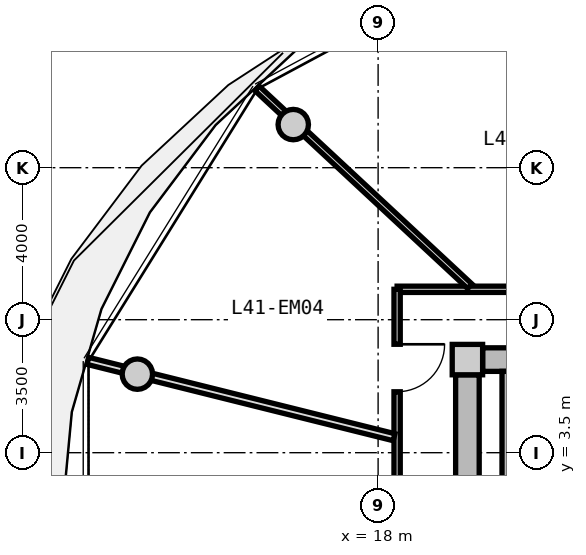
"""IFC4 building model, lengths in metres.
Left out: names, types, materials, properties, quantities, classifications, styles, units other than length and angle.
Written with IfcOpenShell. Run it as: python <this file> out.ifc"""

import sys

from ifc_helpers import new_model, si_unit, direction, frame, frame_2d, origin, origin_2d, place, context, subcontext, project, spatial, rectangle, circle, extrude, source, transform, mapped, element, fill, save


model = new_model("IFC4")
c1 = context("Model", 3, precision=1e-05, world=origin(), true_north=direction((0.0, 1.0)))
c2 = subcontext(c1, "Body", "Model", "MODEL_VIEW")
j1 = project(units=[si_unit("LENGTHUNIT", "METRE"), si_unit("PLANEANGLEUNIT", "RADIAN")], contexts=[c1])
p1 = place(None, origin())
s1 = spatial("IfcSite", under=j1, at=p1, CompositionType="ELEMENT")
p2 = place(p1, origin())
s2 = spatial("IfcBuilding", under=s1, at=p2, CompositionType="ELEMENT")
p3 = place(p2, frame((0.0, 0.0, 134.3)))
s3 = spatial("IfcBuildingStorey", under=s2, at=p3, CompositionType="ELEMENT", Elevation=134.3)
m1 = source(origin(), c2, "Body", "SweptSolid", [
    extrude(rectangle(XDim=0.8, YDim=0.8, at=origin_2d()), origin(), (0.0, 0.0, 1.0), 3.05),
])
p4 = place(p3, frame((20.35, 5.95, 0.0), z_axis=(0.0, 0.0, 1.0), x_axis=(1.0, 0.0, 0.0)))
e1 = element("IfcColumn", 1, at=p4, inside=s3, PredefinedType="COLUMN", context=c2, shape_type="MappedRepresentation", body=[
    mapped(m1, transform((0.0, 0.0, 0.0), x_axis=(1.0, 0.0, 0.0), y_axis=(0.0, 1.0, 0.0), z_axis=(0.0, 0.0, 1.0), scale=1.0)),
])
m2 = source(origin(), c2, "Body", "SweptSolid", [
    extrude(rectangle(XDim=14.5, YDim=0.62, at=frame_2d((7.25, 0.0))), origin(), (0.0, 0.0, 1.0), 2.81),
])
p5 = place(p3, frame((20.75, 5.95, 0.0), z_axis=(0.0, 0.0, 1.0), x_axis=(1.0, 0.0, 0.0)))
e2 = element("IfcWall", 2, at=p5, inside=s3, PredefinedType="SHEAR", context=c2, shape_type="MappedRepresentation", body=[
    mapped(m2, transform((0.0, 0.0, 0.0), x_axis=(1.0, 0.0, 0.0), y_axis=(0.0, 1.0, 0.0), z_axis=(0.0, 0.0, 1.0), scale=1.0)),
])
m3 = source(origin(), c2, "Body", "SweptSolid", [
    extrude(rectangle(XDim=11.1, YDim=0.62, at=frame_2d((5.55, 0.0))), origin(), (0.0, 0.0, 1.0), 2.81),
])
p6 = place(p3, frame((20.35, -5.55, 0.0), z_axis=(0.0, 0.0, 1.0), x_axis=(0.0, 1.0, 0.0)))
e3 = element("IfcWall", 3, at=p6, inside=s3, PredefinedType="SHEAR", context=c2, shape_type="MappedRepresentation", body=[
    mapped(m3, transform((0.0, 0.0, 0.0), x_axis=(1.0, 0.0, 0.0), y_axis=(0.0, 1.0, 0.0), z_axis=(0.0, 0.0, 1.0), scale=1.0)),
])
p7 = place(p6, frame((3.8, 0.0, 0.0)))
e4 = element("IfcOpeningElement", 4, at=p7, cuts=e3, PredefinedType="OPENING", context=c2, shape_type="SweptSolid", body=[
    extrude(rectangle(XDim=1.2, YDim=2.15, at=frame_2d((0.6, 1.075))), frame((0.0, 0.32, 0.0), z_axis=(0.0, -1.0, 0.0), x_axis=(1.0, 0.0, 0.0)), (0.0, 0.0, 1.0), 0.64),
])
m4 = source(origin(), c2, "Body", "SweptSolid", [
    extrude(circle(Radius=0.4, at=origin_2d()), origin(), (0.0, 0.0, 1.0), 3.47),
])
for number, where, z_axis, x_axis in (
    (5, (15.767, 12.135, -0.42), (0.0, 0.0, 1.0), (1.0, 0.0, 0.0)),
    (6, (11.665, 5.567, -0.42), (0.0, 0.0, 1.0), (1.0, 0.0, 0.0)),
):
    element("IfcColumn", number, at=place(p3, frame(where, z_axis=z_axis, x_axis=x_axis)), inside=s3, PredefinedType="COLUMN", context=c2, shape_type="MappedRepresentation", body=[
        mapped(m4, transform((0.0, 0.0, 0.0), x_axis=(1.0, 0.0, 0.0), y_axis=(0.0, 1.0, 0.0), z_axis=(0.0, 0.0, 1.0), scale=1.0)),
    ])
m5 = source(origin(), c2, "Body", "SweptSolid", [
    extrude(rectangle(XDim=3.19, YDim=0.24, at=frame_2d((1.595, 0.0))), origin(), (0.0, 0.0, 1.0), 2.81),
])
p8 = place(p3, frame((21.38, 2.45, 0.0), z_axis=(0.0, 0.0, 1.0), x_axis=(0.0, 1.0, 0.0)))
e7 = element("IfcWall", 7, at=p8, inside=s3, PredefinedType="PARTITIONING", context=c2, shape_type="MappedRepresentation", body=[
    mapped(m5, transform((0.0, 0.0, 0.0), x_axis=(1.0, 0.0, 0.0), y_axis=(0.0, 1.0, 0.0), z_axis=(0.0, 0.0, 1.0), scale=1.0)),
])
m6 = source(origin(), c2, "Body", "SweptSolid", [
    extrude(rectangle(XDim=8.6, YDim=0.165, at=frame_2d((4.3, 0.0))), origin(), (0.0, 0.0, 1.0), 2.795),
])
p9 = place(p3, frame((18.5, 7.8, 0.0), z_axis=(0.0, 0.0, 1.0), x_axis=(1.0, 0.0, 0.0)))
e8 = element("IfcWall", 8, at=p9, inside=s3, PredefinedType="PARTITIONING", context=c2, shape_type="MappedRepresentation", body=[
    mapped(m6, transform((0.0, 0.0, 0.0), x_axis=(1.0, 0.0, 0.0), y_axis=(0.0, 1.0, 0.0), z_axis=(0.0, 0.0, 1.0), scale=1.0)),
])
m7 = source(origin(), c2, "Body", "SweptSolid", [
    extrude(rectangle(XDim=15.6, YDim=0.165, at=frame_2d((7.8, 0.0))), origin(), (0.0, 0.0, 1.0), 2.795),
])
p10 = place(p3, frame((18.5, -7.8, 0.0), z_axis=(0.0, 0.0, 1.0), x_axis=(0.0, 1.0, 0.0)))
e9 = element("IfcWall", 9, at=p10, inside=s3, PredefinedType="PARTITIONING", context=c2, shape_type="MappedRepresentation", body=[
    mapped(m7, transform((0.0, 0.0, 0.0), x_axis=(1.0, 0.0, 0.0), y_axis=(0.0, 1.0, 0.0), z_axis=(0.0, 0.0, 1.0), scale=1.0)),
])
p11 = place(p10, frame((12.903, 0.0, 0.0)))
e10 = element("IfcOpeningElement", 10, at=p11, cuts=e9, PredefinedType="OPENING", context=c2, shape_type="SweptSolid", body=[
    extrude(rectangle(XDim=1.25, YDim=2.2, at=frame_2d((0.625, 1.1))), frame((0.0, 0.093, 0.0), z_axis=(0.0, -1.0, 0.0), x_axis=(1.0, 0.0, 0.0)), (0.0, 0.0, 1.0), 0.185),
])
p12 = place(p10, frame((8.95, 0.0, 0.0)))
e11 = element("IfcOpeningElement", 11, at=p12, cuts=e9, PredefinedType="OPENING", context=c2, shape_type="SweptSolid", body=[
    extrude(rectangle(XDim=1.25, YDim=2.2, at=frame_2d((0.625, 1.1))), frame((0.0, 0.093, 0.0), z_axis=(0.0, -1.0, 0.0), x_axis=(1.0, 0.0, 0.0)), (0.0, 0.0, 1.0), 0.185),
])
m8 = source(origin(), c2, "Body", "SweptSolid", [
    extrude(rectangle(XDim=7.648, YDim=0.165, at=frame_2d((3.824, 0.0))), origin(), (0.0, 0.0, 1.0), 2.345),
])
p13 = place(p3, frame((20.413, 7.88, 0.0), z_axis=(0.0, 0.0, 1.0), x_axis=(-0.732182665826, 0.681108320213, 0.0)))
e12 = element("IfcWall", 12, at=p13, inside=s3, PredefinedType="PARTITIONING", context=c2, shape_type="MappedRepresentation", body=[
    mapped(m8, transform((0.0, 0.0, 0.0), x_axis=(1.0, 0.0, 0.0), y_axis=(0.0, 1.0, 0.0), z_axis=(0.0, 0.0, 1.0), scale=1.0)),
])
m9 = source(origin(), c2, "Body", "SweptSolid", [
    extrude(rectangle(XDim=8.305, YDim=0.19, at=frame_2d((4.153, 0.0))), origin(), (0.0, 0.0, 1.0), 2.345),
])
p14 = place(p3, frame((18.42, 3.908, 0.0), z_axis=(0.0, 0.0, 1.0), x_axis=(-0.970309994378, 0.241864662175, 0.0)))
e13 = element("IfcWall", 13, at=p14, inside=s3, PredefinedType="PARTITIONING", context=c2, shape_type="MappedRepresentation", body=[
    mapped(m9, transform((0.0, 0.0, 0.0), x_axis=(1.0, 0.0, 0.0), y_axis=(0.0, 1.0, 0.0), z_axis=(0.0, 0.0, 1.0), scale=1.0)),
])
m10 = source(origin(), c2, "Body", "SweptSolid", [
    extrude(rectangle(XDim=1.25, YDim=2.2, at=frame_2d((0.625, 1.1))), frame((0.0, 0.025, 0.0), z_axis=(0.0, -1.0, 0.0), x_axis=(1.0, 0.0, 0.0)), (0.0, 0.0, 1.0), 0.05),
])
p15 = place(p11, frame((1.25, 0.0, 0.0), z_axis=(0.0, 0.0, 1.0), x_axis=(-1.0, 0.0, 0.0)))
e14 = element("IfcDoor", 14, at=p15, inside=s3, OperationType="SINGLE_SWING_LEFT", PredefinedType="DOOR", context=c2, shape_type="MappedRepresentation", body=[
    mapped(m10, transform((0.0, 0.0, 0.0), x_axis=(1.0, 0.0, 0.0), y_axis=(0.0, 1.0, 0.0), z_axis=(0.0, 0.0, 1.0), scale=1.0)),
])
fill(e10, e14)
save(model, sys.argv[1])
